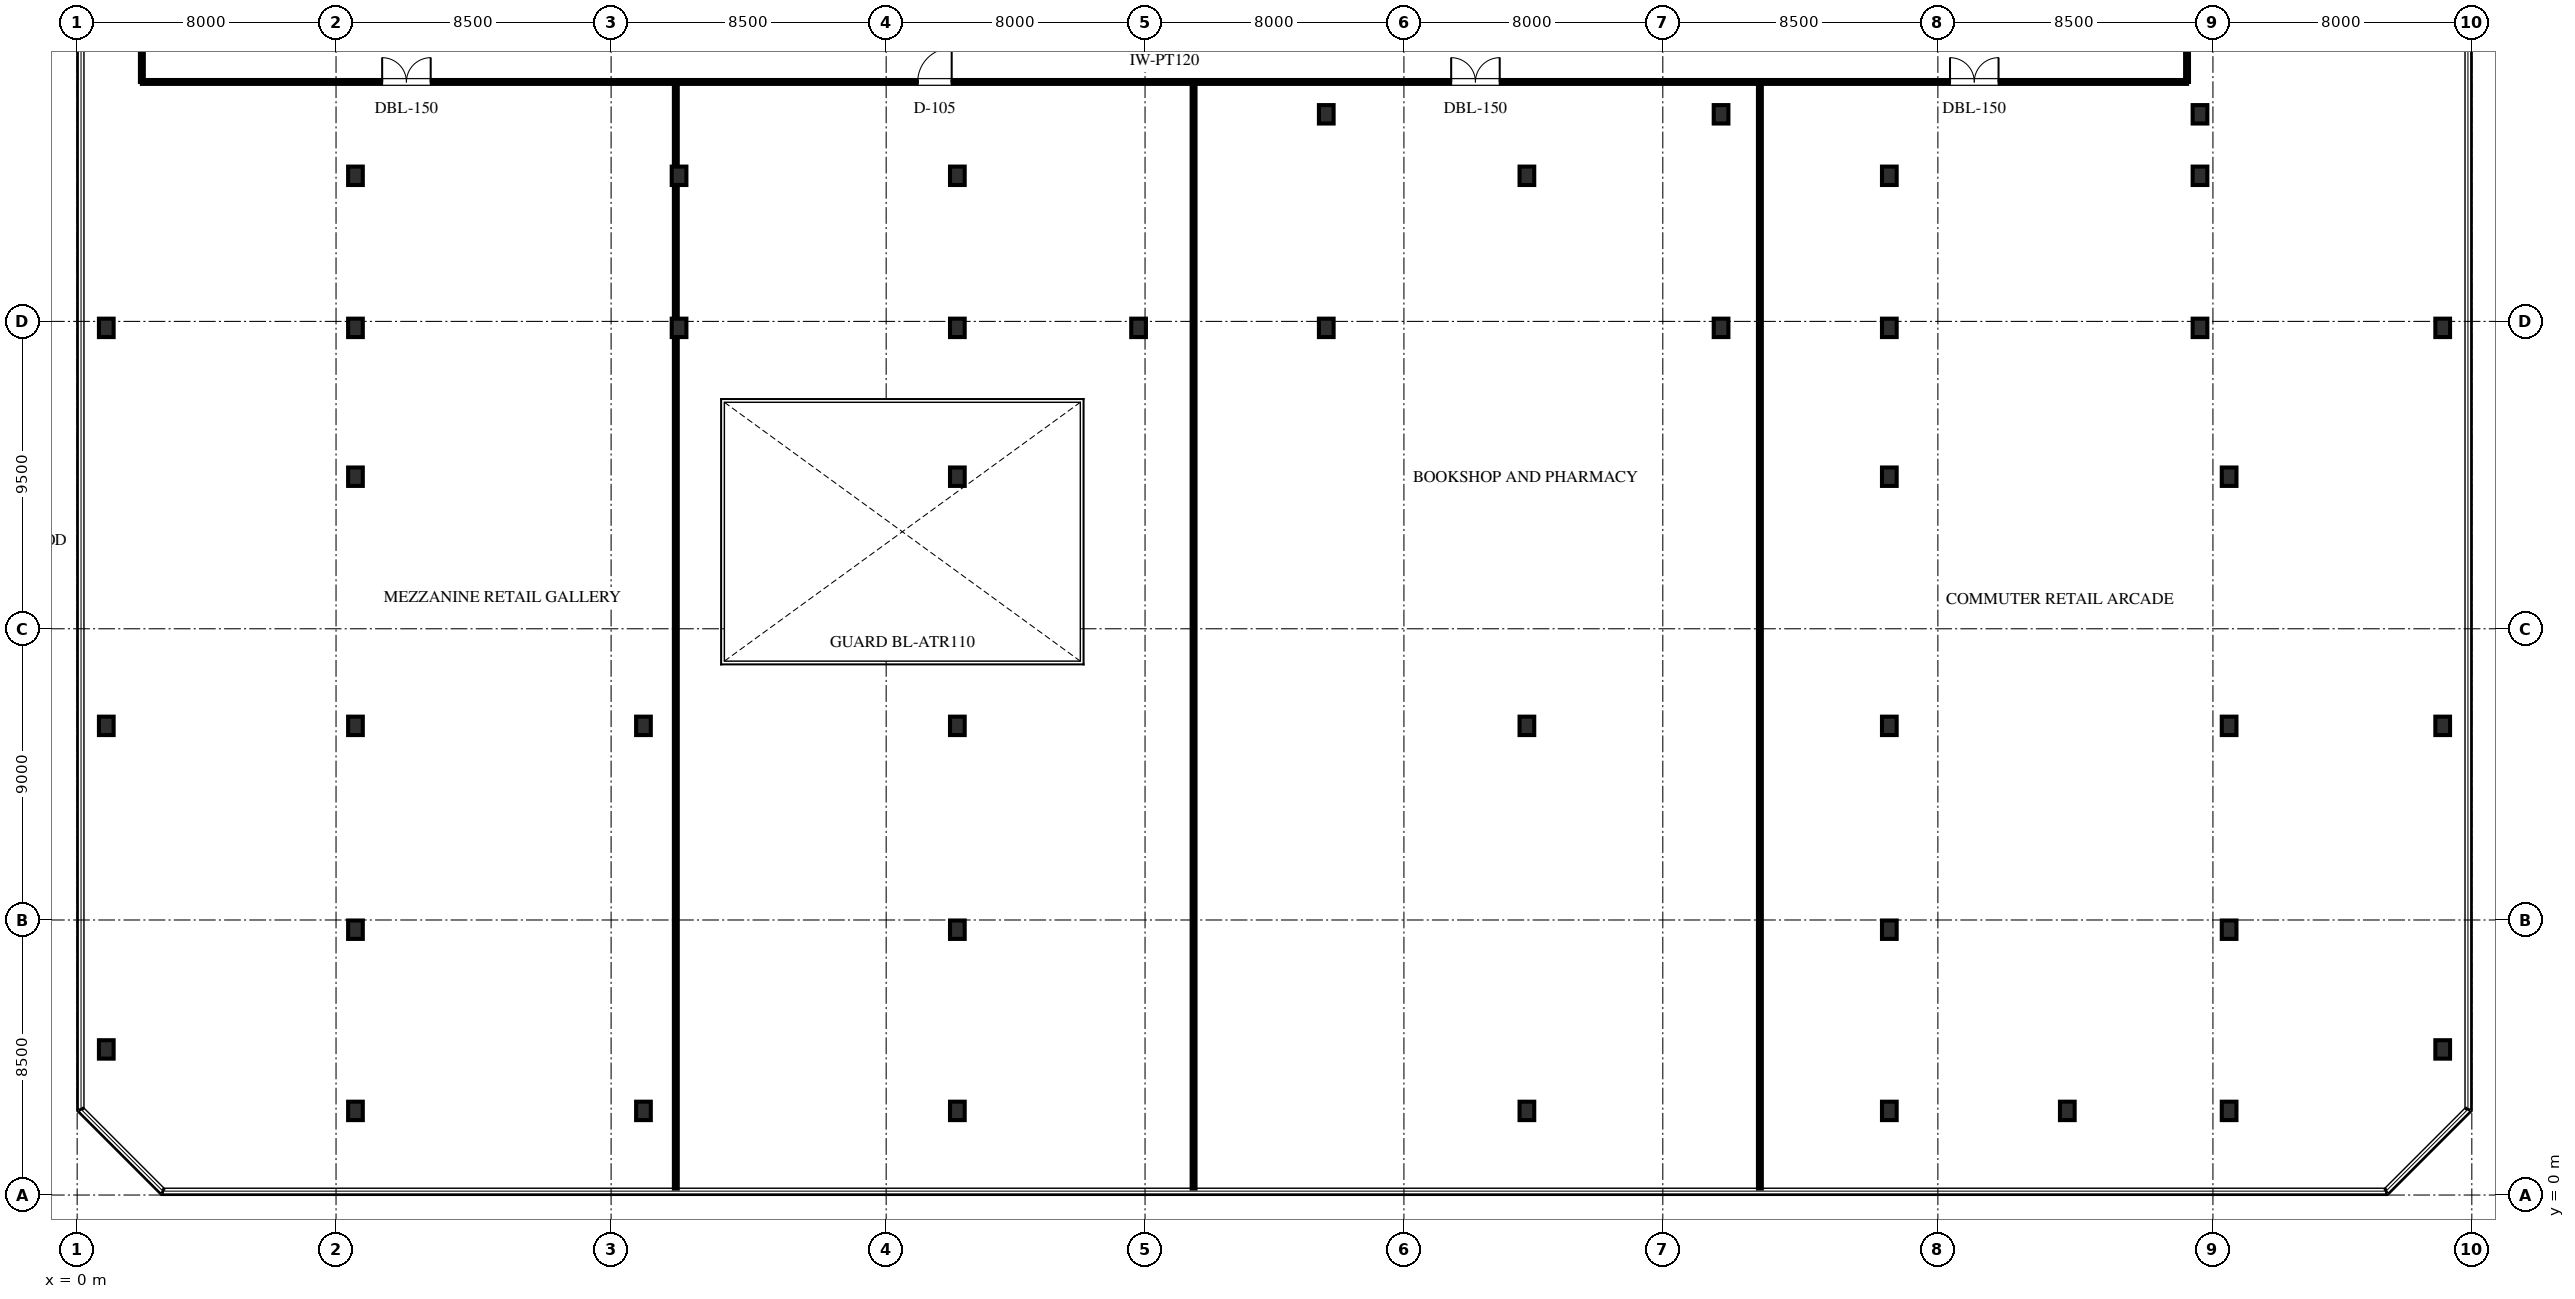
"""IFC4 building model, lengths in metres.
Left out: names, types, materials, properties, quantities, classifications, styles, units other than length and angle.
Written with IfcOpenShell. Run it as: python <this file> out.ifc"""

import sys

from ifc_helpers import new_model, si_unit, direction, frame, frame_2d, origin, origin_2d, place, context, subcontext, project, spatial, rectangle, i_section, extrude, element, fill, save


model = new_model("IFC4")
c1 = context("Model", 3, precision=1e-05, world=origin(), true_north=direction((0.0, 1.0)))
c2 = subcontext(c1, "Body", "Model", "MODEL_VIEW")
j1 = project(units=[si_unit("LENGTHUNIT", "METRE"), si_unit("PLANEANGLEUNIT", "RADIAN")], contexts=[c1])
p1 = place(None, origin())
s1 = spatial("IfcSite", under=j1, at=p1, CompositionType="ELEMENT")
p2 = place(p1, origin())
s2 = spatial("IfcBuilding", under=s1, at=p2, CompositionType="ELEMENT")
p3 = place(p2, frame((0.0, 0.0, 5.4)))
s3 = spatial("IfcBuildingStorey", under=s2, at=p3, CompositionType="ELEMENT", Elevation=5.4)
for number, where, z_axis, x_axis in (
    (1, (8.6, 2.6, 0.0), (0.0, 0.0, 1.0), (1.0, 0.0, 0.0)),
    (2, (17.5, 2.6, 0.0), (0.0, 0.0, 1.0), (1.0, 0.0, 0.0)),
    (3, (27.2, 2.6, 0.0), (0.0, 0.0, 1.0), (1.0, 0.0, 0.0)),
    (4, (44.8, 2.6, 0.0), (0.0, 0.0, 1.0), (1.0, 0.0, 0.0)),
    (5, (56.0, 2.6, 0.0), (0.0, 0.0, 1.0), (1.0, 0.0, 0.0)),
    (6, (61.5, 2.6, 0.0), (0.0, 0.0, 1.0), (1.0, 0.0, 0.0)),
    (7, (66.5, 2.6, 0.0), (0.0, 0.0, 1.0), (1.0, 0.0, 0.0)),
    (8, (8.6, 8.2, 0.0), (0.0, 0.0, 1.0), (1.0, 0.0, 0.0)),
    (9, (27.2, 8.2, 0.0), (0.0, 0.0, 1.0), (1.0, 0.0, 0.0)),
    (10, (56.0, 8.2, 0.0), (0.0, 0.0, 1.0), (1.0, 0.0, 0.0)),
    (11, (66.5, 8.2, 0.0), (0.0, 0.0, 1.0), (1.0, 0.0, 0.0)),
    (12, (8.6, 14.5, 0.0), (0.0, 0.0, 1.0), (1.0, 0.0, 0.0)),
    (13, (17.5, 14.5, 0.0), (0.0, 0.0, 1.0), (1.0, 0.0, 0.0)),
    (14, (27.2, 14.5, 0.0), (0.0, 0.0, 1.0), (1.0, 0.0, 0.0)),
    (15, (44.8, 14.5, 0.0), (0.0, 0.0, 1.0), (1.0, 0.0, 0.0)),
    (16, (56.0, 14.5, 0.0), (0.0, 0.0, 1.0), (1.0, 0.0, 0.0)),
    (17, (66.5, 14.5, 0.0), (0.0, 0.0, 1.0), (1.0, 0.0, 0.0)),
    (18, (8.6, 22.2, 0.0), (0.0, 0.0, 1.0), (1.0, 0.0, 0.0)),
    (19, (27.2, 22.2, 0.0), (0.0, 0.0, 1.0), (1.0, 0.0, 0.0)),
    (20, (56.0, 22.2, 0.0), (0.0, 0.0, 1.0), (1.0, 0.0, 0.0)),
    (21, (66.5, 22.2, 0.0), (0.0, 0.0, 1.0), (1.0, 0.0, 0.0)),
    (22, (8.6, 26.8, 0.0), (0.0, 0.0, 1.0), (1.0, 0.0, 0.0)),
    (23, (18.6, 26.8, 0.0), (0.0, 0.0, 1.0), (1.0, 0.0, 0.0)),
    (24, (27.2, 26.8, 0.0), (0.0, 0.0, 1.0), (1.0, 0.0, 0.0)),
    (25, (32.8, 26.8, 0.0), (0.0, 0.0, 1.0), (1.0, 0.0, 0.0)),
    (26, (38.6, 26.8, 0.0), (0.0, 0.0, 1.0), (1.0, 0.0, 0.0)),
    (27, (50.8, 26.8, 0.0), (0.0, 0.0, 1.0), (1.0, 0.0, 0.0)),
    (28, (56.0, 26.8, 0.0), (0.0, 0.0, 1.0), (1.0, 0.0, 0.0)),
    (29, (65.6, 26.8, 0.0), (0.0, 0.0, 1.0), (1.0, 0.0, 0.0)),
    (30, (8.6, 31.5, 0.0), (0.0, 0.0, 1.0), (1.0, 0.0, 0.0)),
    (31, (18.6, 31.5, 0.0), (0.0, 0.0, 1.0), (1.0, 0.0, 0.0)),
    (32, (27.2, 31.5, 0.0), (0.0, 0.0, 1.0), (1.0, 0.0, 0.0)),
    (33, (44.8, 31.5, 0.0), (0.0, 0.0, 1.0), (1.0, 0.0, 0.0)),
    (34, (56.0, 31.5, 0.0), (0.0, 0.0, 1.0), (1.0, 0.0, 0.0)),
    (35, (65.6, 31.5, 0.0), (0.0, 0.0, 1.0), (1.0, 0.0, 0.0)),
    (36, (0.9, 4.5, 0.0), (0.0, 0.0, 1.0), (1.0, 0.0, 0.0)),
    (37, (0.9, 14.5, 0.0), (0.0, 0.0, 1.0), (1.0, 0.0, 0.0)),
    (38, (0.9, 26.8, 0.0), (0.0, 0.0, 1.0), (1.0, 0.0, 0.0)),
    (39, (73.1, 4.5, 0.0), (0.0, 0.0, 1.0), (1.0, 0.0, 0.0)),
    (40, (73.1, 14.5, 0.0), (0.0, 0.0, 1.0), (1.0, 0.0, 0.0)),
    (41, (73.1, 26.8, 0.0), (0.0, 0.0, 1.0), (1.0, 0.0, 0.0)),
    (42, (38.6, 33.4, 0.0), (0.0, 0.0, 1.0), (1.0, 0.0, 0.0)),
    (43, (50.8, 33.4, 0.0), (0.0, 0.0, 1.0), (1.0, 0.0, 0.0)),
    (44, (65.6, 33.4, 0.0), (0.0, 0.0, 1.0), (1.0, 0.0, 0.0)),
):
    element("IfcColumn", number, at=place(p3, frame(where, z_axis=z_axis, x_axis=x_axis)), inside=s3, PredefinedType="COLUMN", context=c2, shape_type="SweptSolid", body=[
        extrude(i_section(OverallWidth=0.454, OverallDepth=0.569, WebThickness=0.078, FlangeThickness=0.125, FilletRadius=0.03, at=origin_2d()), origin(), (0.0, 0.0, 1.0), 5.4),
    ])
p4 = place(p3, frame((2.0, 34.4, 0.0), z_axis=(0.0, 0.0, 1.0), x_axis=(1.0, 0.0, 0.0)))
e45 = element("IfcWall", 45, at=p4, inside=s3, PredefinedType="PARTITIONING", context=c2, shape_type="SweptSolid", body=[
    extrude(rectangle(XDim=63.2, YDim=0.12, at=frame_2d((31.6, 0.0))), origin(), (0.0, 0.0, 1.0), 4.182),
])
p5 = place(p4, frame((7.425, 0.0, 0.0)))
e46 = element("IfcOpeningElement", 46, at=p5, cuts=e45, PredefinedType="OPENING", context=c2, shape_type="SweptSolid", body=[
    extrude(rectangle(XDim=1.5, YDim=2.2, at=frame_2d((0.75, 1.1))), frame((0.0, 0.07, 0.0), z_axis=(0.0, -1.0, 0.0), x_axis=(1.0, 0.0, 0.0)), (0.0, 0.0, 1.0), 0.14),
])
p6 = place(p4, frame((23.975, 0.0, 0.0)))
e47 = element("IfcOpeningElement", 47, at=p6, cuts=e45, PredefinedType="OPENING", context=c2, shape_type="SweptSolid", body=[
    extrude(rectangle(XDim=1.05, YDim=2.2, at=frame_2d((0.525, 1.1))), frame((0.0, 0.07, 0.0), z_axis=(0.0, -1.0, 0.0), x_axis=(1.0, 0.0, 0.0)), (0.0, 0.0, 1.0), 0.14),
])
p7 = place(p4, frame((40.46, 0.0, 0.0)))
e48 = element("IfcOpeningElement", 48, at=p7, cuts=e45, PredefinedType="OPENING", context=c2, shape_type="SweptSolid", body=[
    extrude(rectangle(XDim=1.5, YDim=2.2, at=frame_2d((0.75, 1.1))), frame((0.0, 0.07, 0.0), z_axis=(0.0, -1.0, 0.0), x_axis=(1.0, 0.0, 0.0)), (0.0, 0.0, 1.0), 0.14),
])
p8 = place(p4, frame((55.875, 0.0, 0.0)))
e49 = element("IfcOpeningElement", 49, at=p8, cuts=e45, PredefinedType="OPENING", context=c2, shape_type="SweptSolid", body=[
    extrude(rectangle(XDim=1.5, YDim=2.2, at=frame_2d((0.75, 1.1))), frame((0.0, 0.07, 0.0), z_axis=(0.0, -1.0, 0.0), x_axis=(1.0, 0.0, 0.0)), (0.0, 0.0, 1.0), 0.14),
])
p9 = place(p3, frame((2.0, 34.4, 0.0), z_axis=(0.0, 0.0, 1.0), x_axis=(0.0, 1.0, 0.0)))
e50 = element("IfcWall", 50, at=p9, inside=s3, PredefinedType="PARTITIONING", context=c2, shape_type="SweptSolid", body=[
    extrude(rectangle(XDim=3.65, YDim=0.12, at=frame_2d((1.825, 0.0))), origin(), (0.0, 0.0, 1.0), 4.182),
])
p10 = place(p3, frame((65.2, 34.4, 0.0), z_axis=(0.0, 0.0, 1.0), x_axis=(0.0, 1.0, 0.0)))
e51 = element("IfcWall", 51, at=p10, inside=s3, PredefinedType="PARTITIONING", context=c2, shape_type="SweptSolid", body=[
    extrude(rectangle(XDim=3.167, YDim=0.12, at=frame_2d((1.583, 0.0))), origin(), (0.0, 0.0, 1.0), 4.182),
])
for number, where, z_axis, x_axis in (
    (52, (18.5, 0.2, 0.0), (0.0, 0.0, 1.0), (0.0, 1.0, 0.0)),
    (53, (34.5, 0.2, 0.0), (0.0, 0.0, 1.0), (0.0, 1.0, 0.0)),
    (54, (52.0, 0.2, 0.0), (0.0, 0.0, 1.0), (0.0, 1.0, 0.0)),
):
    element("IfcWall", number, at=place(p3, frame(where, z_axis=z_axis, x_axis=x_axis)), inside=s3, PredefinedType="PARTITIONING", context=c2, shape_type="SweptSolid", body=[
        extrude(rectangle(XDim=34.132, YDim=0.12, at=frame_2d((17.066, 0.0))), origin(), (0.0, 0.0, 1.0), 4.182),
    ])
p11 = place(p5, origin())
e55 = element("IfcDoor", 55, at=p11, inside=s3, OperationType="DOUBLE_DOOR_SINGLE_SWING", PredefinedType="DOOR", context=c2, shape_type="SweptSolid", body=[
    extrude(rectangle(XDim=1.5, YDim=2.2, at=frame_2d((0.75, 1.1))), frame((0.0, 0.025, 0.0), z_axis=(0.0, -1.0, 0.0), x_axis=(1.0, 0.0, 0.0)), (0.0, 0.0, 1.0), 0.05),
])
fill(e46, e55)
p12 = place(p6, origin())
e56 = element("IfcDoor", 56, at=p12, inside=s3, OperationType="SINGLE_SWING_RIGHT", PredefinedType="DOOR", context=c2, shape_type="SweptSolid", body=[
    extrude(rectangle(XDim=1.05, YDim=2.2, at=frame_2d((0.525, 1.1))), frame((0.0, 0.025, 0.0), z_axis=(0.0, -1.0, 0.0), x_axis=(1.0, 0.0, 0.0)), (0.0, 0.0, 1.0), 0.05),
])
fill(e47, e56)
p13 = place(p7, origin())
e57 = element("IfcDoor", 57, at=p13, inside=s3, OperationType="DOUBLE_DOOR_SINGLE_SWING", PredefinedType="DOOR", context=c2, shape_type="SweptSolid", body=[
    extrude(rectangle(XDim=1.5, YDim=2.2, at=frame_2d((0.75, 1.1))), frame((0.0, 0.025, 0.0), z_axis=(0.0, -1.0, 0.0), x_axis=(1.0, 0.0, 0.0)), (0.0, 0.0, 1.0), 0.05),
])
fill(e48, e57)
p14 = place(p8, origin())
e58 = element("IfcDoor", 58, at=p14, inside=s3, OperationType="DOUBLE_DOOR_SINGLE_SWING", PredefinedType="DOOR", context=c2, shape_type="SweptSolid", body=[
    extrude(rectangle(XDim=1.5, YDim=2.2, at=frame_2d((0.75, 1.1))), frame((0.0, 0.025, 0.0), z_axis=(0.0, -1.0, 0.0), x_axis=(1.0, 0.0, 0.0)), (0.0, 0.0, 1.0), 0.05),
])
fill(e49, e58)
save(model, sys.argv[1])
